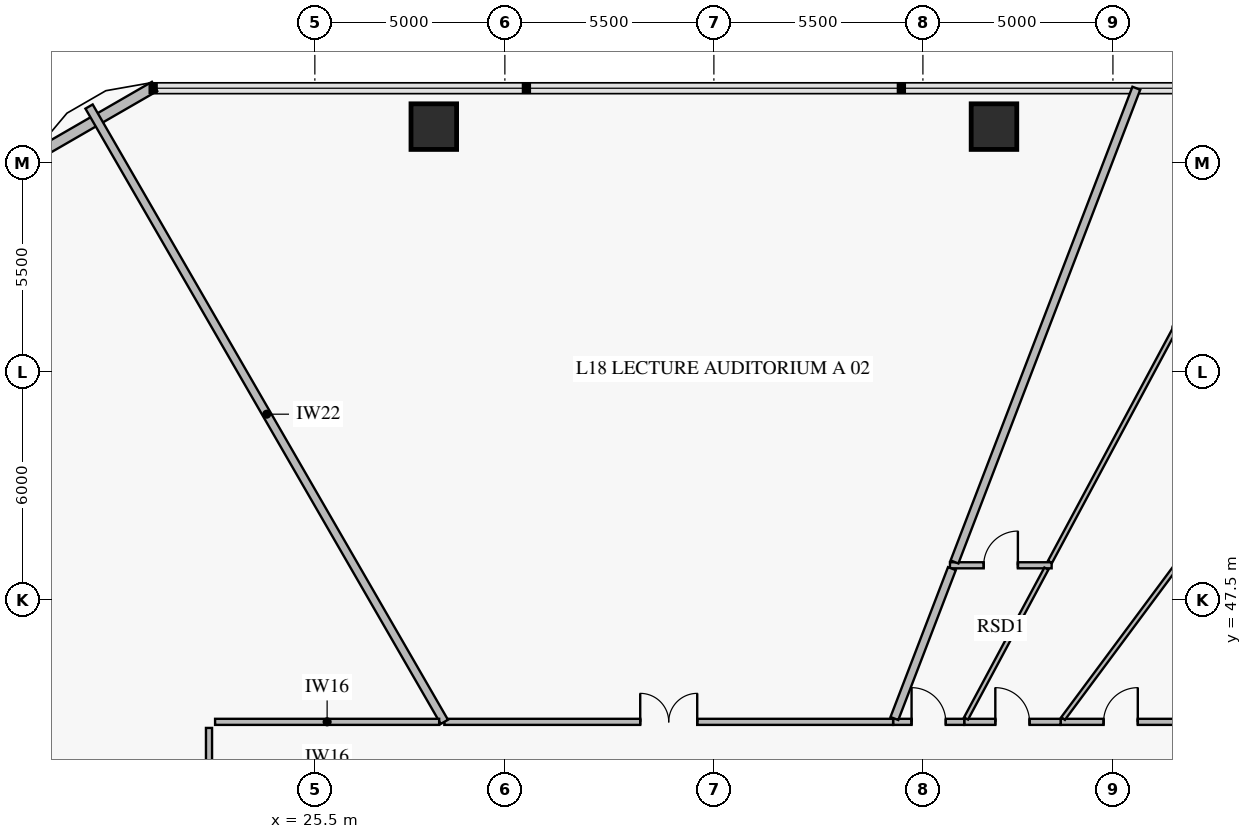
"""IFC4 building model, lengths in metres.
Left out: names, types, materials, properties, quantities, classifications, styles, units other than length and angle.
Written with IfcOpenShell. Run it as: python <this file> out.ifc"""

import sys

from ifc_helpers import new_model, si_unit, direction, frame, frame_2d, origin, origin_2d, place, context, subcontext, project, spatial, rectangle, extrude, element, fill, save


model = new_model("IFC4")
c1 = context("Model", 3, precision=1e-05, world=origin(), true_north=direction((0.0, 1.0)))
c2 = subcontext(c1, "Body", "Model", "MODEL_VIEW")
j1 = project(units=[si_unit("LENGTHUNIT", "METRE"), si_unit("PLANEANGLEUNIT", "RADIAN")], contexts=[c1])
p1 = place(None, origin())
s1 = spatial("IfcSite", under=j1, at=p1, CompositionType="ELEMENT")
p2 = place(p1, origin())
s2 = spatial("IfcBuilding", under=s1, at=p2, CompositionType="ELEMENT")
p3 = place(p2, frame((0.0, 0.0, 75.0)))
s3 = spatial("IfcBuildingStorey", under=s2, at=p3, CompositionType="ELEMENT", Elevation=75.0)
for number, where, z_axis, x_axis in (
    (1, (43.37, 59.948, 0.0), (0.0, 0.0, 1.0), (-1.0, 0.0, 0.0)),
    (2, (28.63, 59.948, 0.0), (0.0, 0.0, 1.0), (-1.0, 0.0, 0.0)),
):
    element("IfcColumn", number, at=place(p3, frame(where, z_axis=z_axis, x_axis=x_axis)), inside=s3, PredefinedType="COLUMN", context=c2, shape_type="SweptSolid", body=[
        extrude(rectangle(XDim=1.2, YDim=1.2, at=origin_2d()), origin(), (0.0, 0.0, 1.0), 3.92),
    ])
p4 = place(p3, frame((18.239, 59.249, 0.0), z_axis=(0.0, 0.0, 1.0), x_axis=(0.866007452331, 0.500031091541, 0.0)))
e3 = element("IfcWall", 3, at=p4, inside=s3, PredefinedType="SOLIDWALL", context=c2, shape_type="SweptSolid", body=[
    extrude(rectangle(XDim=3.515, YDim=0.28, at=frame_2d((1.757, 0.0))), origin(), (0.0, 0.0, 1.0), 3.92),
])
p5 = place(p3, frame((48.285, 44.285, 0.0), z_axis=(0.0, 0.0, 1.0), x_axis=(-1.0, 0.0, 0.0)))
e4 = element("IfcWall", 4, at=p5, inside=s3, PredefinedType="PARTITIONING", context=c2, shape_type="SweptSolid", body=[
    extrude(rectangle(XDim=3.161, YDim=0.16, at=frame_2d((1.581, 0.0))), origin(), (0.0, 0.0, 1.0), 3.22),
])
p6 = place(p5, frame((1.131, 0.0, 0.0)))
e5 = element("IfcOpeningElement", 5, at=p6, cuts=e4, PredefinedType="OPENING", context=c2, shape_type="SweptSolid", body=[
    extrude(rectangle(XDim=0.9, YDim=2.1, at=frame_2d((0.45, 1.05))), frame((0.0, 0.092, 0.0), z_axis=(0.0, -1.0, 0.0), x_axis=(1.0, 0.0, 0.0)), (0.0, 0.0, 1.0), 0.184),
])
p7 = place(p3, frame((45.124, 44.285, 0.0), z_axis=(0.0, 0.0, 1.0), x_axis=(-1.0, 0.0, 0.0)))
e6 = element("IfcWall", 6, at=p7, inside=s3, PredefinedType="PARTITIONING", context=c2, shape_type="SweptSolid", body=[
    extrude(rectangle(XDim=2.536, YDim=0.16, at=frame_2d((1.268, 0.0))), origin(), (0.0, 0.0, 1.0), 3.92),
])
p8 = place(p7, frame((0.818, 0.0, 0.0)))
e7 = element("IfcOpeningElement", 7, at=p8, cuts=e6, PredefinedType="OPENING", context=c2, shape_type="SweptSolid", body=[
    extrude(rectangle(XDim=0.9, YDim=2.1, at=frame_2d((0.45, 1.05))), frame((0.0, 0.092, 0.0), z_axis=(0.0, -1.0, 0.0), x_axis=(1.0, 0.0, 0.0)), (0.0, 0.0, 1.0), 0.184),
])
p9 = place(p3, frame((42.212, 48.405, 0.0), z_axis=(0.0, 0.0, 1.0), x_axis=(1.0, 0.0, 0.0)))
e8 = element("IfcWall", 8, at=p9, inside=s3, PredefinedType="PARTITIONING", context=c2, shape_type="SweptSolid", body=[
    extrude(rectangle(XDim=2.676, YDim=0.16, at=frame_2d((1.338, 0.0))), origin(), (0.0, 0.0, 1.0), 3.92),
])
p10 = place(p9, frame((0.888, 0.0, 0.0)))
e9 = element("IfcOpeningElement", 9, at=p10, cuts=e8, PredefinedType="OPENING", context=c2, shape_type="SweptSolid", body=[
    extrude(rectangle(XDim=0.9, YDim=2.1, at=frame_2d((0.45, 1.05))), frame((0.0, 0.092, 0.0), z_axis=(0.0, -1.0, 0.0), x_axis=(1.0, 0.0, 0.0)), (0.0, 0.0, 1.0), 0.184),
])
p11 = place(p3, frame((42.587, 44.285, 0.0), z_axis=(0.0, 0.0, 1.0), x_axis=(-1.0, 0.0, 0.0)))
e10 = element("IfcWall", 10, at=p11, inside=s3, PredefinedType="PARTITIONING", context=c2, shape_type="SweptSolid", body=[
    extrude(rectangle(XDim=1.871, YDim=0.16, at=frame_2d((0.936, 0.0))), origin(), (0.0, 0.0, 1.0), 3.92),
])
p12 = place(p11, frame((0.486, 0.0, 0.0)))
e11 = element("IfcOpeningElement", 11, at=p12, cuts=e10, PredefinedType="OPENING", context=c2, shape_type="SweptSolid", body=[
    extrude(rectangle(XDim=0.9, YDim=2.1, at=frame_2d((0.45, 1.05))), frame((0.0, 0.092, 0.0), z_axis=(0.0, -1.0, 0.0), x_axis=(1.0, 0.0, 0.0)), (0.0, 0.0, 1.0), 0.184),
])
p13 = place(p3, frame((40.716, 44.285, 0.0), z_axis=(0.0, 0.0, 1.0), x_axis=(-1.0, 0.0, 0.0)))
e12 = element("IfcWall", 12, at=p13, inside=s3, PredefinedType="PARTITIONING", context=c2, shape_type="SweptSolid", body=[
    extrude(rectangle(XDim=11.809, YDim=0.16, at=frame_2d((5.904, 0.0))), origin(), (0.0, 0.0, 1.0), 3.22),
])
p14 = place(p13, frame((5.154, 0.0, 0.0)))
e13 = element("IfcOpeningElement", 13, at=p14, cuts=e12, PredefinedType="OPENING", context=c2, shape_type="SweptSolid", body=[
    extrude(rectangle(XDim=1.5, YDim=2.15, at=frame_2d((0.75, 1.075))), frame((0.0, 0.092, 0.0), z_axis=(0.0, -1.0, 0.0), x_axis=(1.0, 0.0, 0.0)), (0.0, 0.0, 1.0), 0.184),
])
p15 = place(p3, frame((22.715, 44.125, 0.0), z_axis=(0.0, 0.0, 1.0), x_axis=(0.0, -1.0, 0.0)))
e14 = element("IfcWall", 14, at=p15, inside=s3, PredefinedType="PARTITIONING", context=c2, shape_type="SweptSolid", body=[
    extrude(rectangle(XDim=10.021, YDim=0.16, at=frame_2d((5.01, 0.0))), origin(), (0.0, 0.0, 1.0), 3.22),
])
p16 = place(p15, frame((4.26, 0.0, 0.0)))
e15 = element("IfcOpeningElement", 15, at=p16, cuts=e14, PredefinedType="OPENING", context=c2, shape_type="SweptSolid", body=[
    extrude(rectangle(XDim=1.5, YDim=2.15, at=frame_2d((0.75, 1.075))), frame((0.0, 0.092, 0.0), z_axis=(0.0, -1.0, 0.0), x_axis=(1.0, 0.0, 0.0)), (0.0, 0.0, 1.0), 0.184),
])
p17 = place(p3, frame((45.189, 44.373, 0.0), z_axis=(0.0, 0.0, 1.0), x_axis=(0.596225418148, 0.802817071788, 0.0)))
e16 = element("IfcWall", 16, at=p17, inside=s3, PredefinedType="PARTITIONING", context=c2, shape_type="SweptSolid", body=[
    extrude(rectangle(XDim=16.142, YDim=0.12, at=frame_2d((8.071, 0.0))), origin(), (0.0, 0.0, 1.0), 3.17),
])
p18 = place(p3, frame((42.634, 44.373, 0.0), z_axis=(0.0, 0.0, 1.0), x_axis=(0.472563527557, 0.881296608653, 0.0)))
e17 = element("IfcWall", 17, at=p18, inside=s3, PredefinedType="PARTITIONING", context=c2, shape_type="SweptSolid", body=[
    extrude(rectangle(XDim=4.475, YDim=0.12, at=frame_2d((2.238, 0.0))), origin(), (0.0, 0.0, 1.0), 3.92),
])
p19 = place(p3, frame((44.844, 48.493, 0.0), z_axis=(0.0, 0.0, 1.0), x_axis=(0.472553457508, 0.881302008279, 0.0)))
e18 = element("IfcWall", 18, at=p19, inside=s3, PredefinedType="PARTITIONING", context=c2, shape_type="SweptSolid", body=[
    extrude(rectangle(XDim=14.016, YDim=0.12, at=frame_2d((7.008, 0.0))), origin(), (0.0, 0.0, 1.0), 3.17),
])
p20 = place(p3, frame((40.75, 44.373, 0.0), z_axis=(0.0, 0.0, 1.0), x_axis=(0.358370990804, 0.933579259062, 0.0)))
e19 = element("IfcWall", 19, at=p20, inside=s3, PredefinedType="PARTITIONING", context=c2, shape_type="SweptSolid", body=[
    extrude(rectangle(XDim=4.224, YDim=0.22, at=frame_2d((2.112, 0.0))), origin(), (0.0, 0.0, 1.0), 3.92),
])
p21 = place(p3, frame((42.331, 48.493, 0.0), z_axis=(0.0, 0.0, 1.0), x_axis=(0.358372511013, 0.933578675501, 0.0)))
e20 = element("IfcWall", 20, at=p21, inside=s3, PredefinedType="PARTITIONING", context=c2, shape_type="SweptSolid", body=[
    extrude(rectangle(XDim=13.353, YDim=0.22, at=frame_2d((6.676, 0.0))), origin(), (0.0, 0.0, 1.0), 3.17),
])
p22 = place(p3, frame((28.907, 44.285, 0.0), z_axis=(0.0, 0.0, 1.0), x_axis=(-0.499994105362, 0.866028807028, 0.0)))
e21 = element("IfcWall", 21, at=p22, inside=s3, PredefinedType="PARTITIONING", context=c2, shape_type="SweptSolid", body=[
    extrude(rectangle(XDim=18.697, YDim=0.22, at=frame_2d((9.349, 0.0))), origin(), (0.0, 0.0, 1.0), 3.17),
])
p23 = place(p3, frame((28.771, 44.285, 0.0), z_axis=(0.0, 0.0, 1.0), x_axis=(-1.0, 0.0, 0.0)))
e22 = element("IfcWall", 22, at=p23, inside=s3, PredefinedType="PARTITIONING", context=c2, shape_type="SweptSolid", body=[
    extrude(rectangle(XDim=5.896, YDim=0.16, at=frame_2d((2.948, 0.0))), origin(), (0.0, 0.0, 1.0), 3.22),
])
p24 = place(p6, frame((0.9, 0.0, 0.0), z_axis=(0.0, 0.0, 1.0), x_axis=(-1.0, 0.0, 0.0)))
e23 = element("IfcDoor", 23, at=p24, inside=s3, OperationType="SINGLE_SWING_RIGHT", PredefinedType="DOOR", context=c2, shape_type="SweptSolid", body=[
    extrude(rectangle(XDim=0.9, YDim=2.1, at=frame_2d((0.45, 1.05))), frame((0.0, 0.025, 0.0), z_axis=(0.0, -1.0, 0.0), x_axis=(1.0, 0.0, 0.0)), (0.0, 0.0, 1.0), 0.05),
])
fill(e5, e23)
p25 = place(p8, frame((0.9, 0.0, 0.0), z_axis=(0.0, 0.0, 1.0), x_axis=(-1.0, 0.0, 0.0)))
e24 = element("IfcDoor", 24, at=p25, inside=s3, OperationType="SINGLE_SWING_LEFT", PredefinedType="DOOR", context=c2, shape_type="SweptSolid", body=[
    extrude(rectangle(XDim=0.9, YDim=2.1, at=frame_2d((0.45, 1.05))), frame((0.0, 0.025, 0.0), z_axis=(0.0, -1.0, 0.0), x_axis=(1.0, 0.0, 0.0)), (0.0, 0.0, 1.0), 0.05),
])
fill(e7, e24)
p26 = place(p10, origin())
e25 = element("IfcDoor", 25, at=p26, inside=s3, OperationType="SINGLE_SWING_RIGHT", PredefinedType="DOOR", context=c2, shape_type="SweptSolid", body=[
    extrude(rectangle(XDim=0.9, YDim=2.1, at=frame_2d((0.45, 1.05))), frame((0.0, 0.025, 0.0), z_axis=(0.0, -1.0, 0.0), x_axis=(1.0, 0.0, 0.0)), (0.0, 0.0, 1.0), 0.05),
])
fill(e9, e25)
p27 = place(p12, frame((0.9, 0.0, 0.0), z_axis=(0.0, 0.0, 1.0), x_axis=(-1.0, 0.0, 0.0)))
e26 = element("IfcDoor", 26, at=p27, inside=s3, OperationType="SINGLE_SWING_LEFT", PredefinedType="DOOR", context=c2, shape_type="SweptSolid", body=[
    extrude(rectangle(XDim=0.9, YDim=2.1, at=frame_2d((0.45, 1.05))), frame((0.0, 0.025, 0.0), z_axis=(0.0, -1.0, 0.0), x_axis=(1.0, 0.0, 0.0)), (0.0, 0.0, 1.0), 0.05),
])
fill(e11, e26)
p28 = place(p14, frame((1.5, 0.0, 0.0), z_axis=(0.0, 0.0, 1.0), x_axis=(-1.0, 0.0, 0.0)))
e27 = element("IfcDoor", 27, at=p28, inside=s3, OperationType="DOUBLE_DOOR_SINGLE_SWING", PredefinedType="DOOR", context=c2, shape_type="SweptSolid", body=[
    extrude(rectangle(XDim=1.5, YDim=2.15, at=frame_2d((0.75, 1.075))), frame((0.0, 0.025, 0.0), z_axis=(0.0, -1.0, 0.0), x_axis=(1.0, 0.0, 0.0)), (0.0, 0.0, 1.0), 0.05),
])
fill(e13, e27)
save(model, sys.argv[1])
